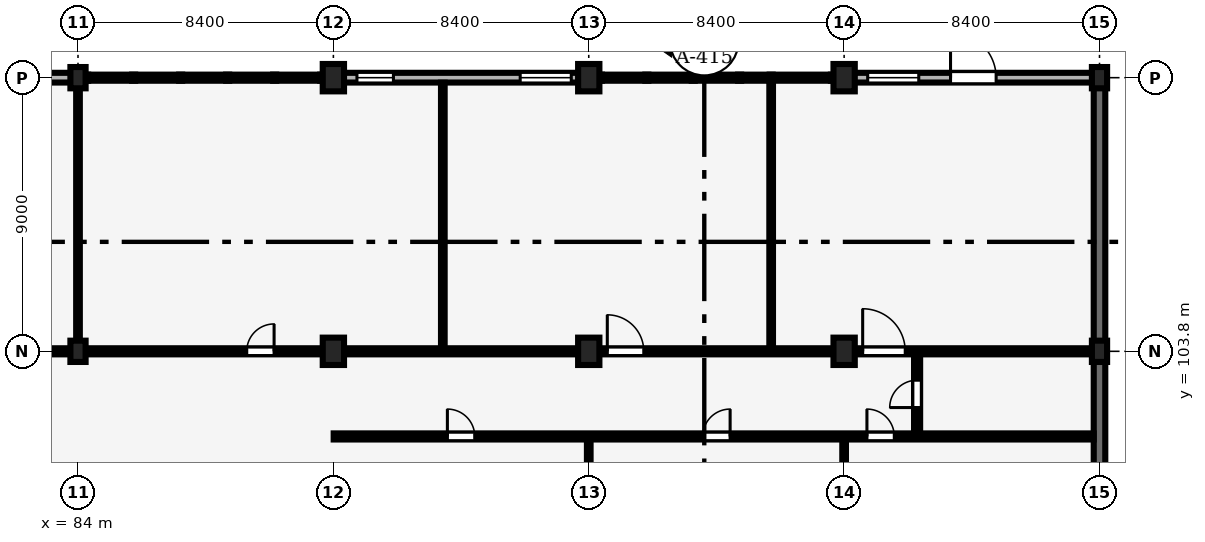
"""IFC4 building model, lengths in metres.
Left out: names, types, materials, properties, quantities, classifications, styles, units other than length and angle.
Written with IfcOpenShell. Run it as: python <this file> out.ifc"""

import sys

from ifc_helpers import new_model, si_unit, direction, frame, frame_2d, origin, origin_2d, place, context, subcontext, project, spatial, rectangle, extrude, element, fill, save


model = new_model("IFC4")
c1 = context("Model", 3, precision=1e-05, world=origin(), true_north=direction((0.0, 1.0)))
c2 = subcontext(c1, "Body", "Model", "MODEL_VIEW")
j1 = project(units=[si_unit("LENGTHUNIT", "METRE"), si_unit("PLANEANGLEUNIT", "RADIAN")], contexts=[c1])
p1 = place(None, origin())
s1 = spatial("IfcSite", under=j1, at=p1, CompositionType="ELEMENT")
p2 = place(p1, origin())
s2 = spatial("IfcBuilding", under=s1, at=p2, CompositionType="ELEMENT")
p3 = place(p2, origin())
s3 = spatial("IfcBuildingStorey", under=s2, at=p3, CompositionType="ELEMENT", Elevation=0.0)
for number, where, z_axis, x_axis in (
    (1, (84.0, 103.8, 0.0), (0.0, 0.0, 1.0), (1.0, 0.0, 0.0)),
    (2, (84.0, 112.8, 0.0), (0.0, 0.0, 1.0), (1.0, 0.0, 0.0)),
):
    element("IfcColumn", number, at=place(p3, frame(where, z_axis=z_axis, x_axis=x_axis)), inside=s3, PredefinedType="COLUMN", context=c2, shape_type="SweptSolid", body=[
        extrude(rectangle(XDim=0.5, YDim=0.7, at=origin_2d()), origin(), (0.0, 0.0, 1.0), 4.8),
    ])
for number, where, z_axis, x_axis in (
    (3, (92.4, 103.8, 0.0), (0.0, 0.0, 1.0), (1.0, 0.0, 0.0)),
    (4, (92.4, 112.8, 0.0), (0.0, 0.0, 1.0), (1.0, 0.0, 0.0)),
    (5, (100.8, 103.8, 0.0), (0.0, 0.0, 1.0), (1.0, 0.0, 0.0)),
    (6, (100.8, 112.8, 0.0), (0.0, 0.0, 1.0), (1.0, 0.0, 0.0)),
    (7, (109.2, 103.8, 0.0), (0.0, 0.0, 1.0), (1.0, 0.0, 0.0)),
    (8, (109.2, 112.8, 0.0), (0.0, 0.0, 1.0), (1.0, 0.0, 0.0)),
):
    element("IfcColumn", number, at=place(p3, frame(where, z_axis=z_axis, x_axis=x_axis)), inside=s3, PredefinedType="COLUMN", context=c2, shape_type="SweptSolid", body=[
        extrude(rectangle(XDim=0.7, YDim=0.9, at=origin_2d()), origin(), (0.0, 0.0, 1.0), 4.8),
    ])
for number, where, z_axis, x_axis in (
    (9, (117.6, 103.8, 0.0), (0.0, 0.0, 1.0), (1.0, 0.0, 0.0)),
    (10, (117.6, 112.8, 0.0), (0.0, 0.0, 1.0), (1.0, 0.0, 0.0)),
):
    element("IfcColumn", number, at=place(p3, frame(where, z_axis=z_axis, x_axis=x_axis)), inside=s3, PredefinedType="COLUMN", context=c2, shape_type="SweptSolid", body=[
        extrude(rectangle(XDim=0.5, YDim=0.7, at=origin_2d()), origin(), (0.0, 0.0, 1.0), 4.8),
    ])
p4 = place(p3, frame((117.6, 95.125, 0.0), z_axis=(0.0, 0.0, 1.0), x_axis=(0.0, 1.0, 0.0)))
e11 = element("IfcWall", 11, at=p4, inside=s3, PredefinedType="SHEAR", context=c2, shape_type="SweptSolid", body=[
    extrude(rectangle(XDim=8.35, YDim=0.38, at=frame_2d((4.175, 0.0))), origin(), (0.0, 0.0, 1.0), 3.57),
])
p5 = place(p3, frame((117.6, 104.125, 0.0), z_axis=(0.0, 0.0, 1.0), x_axis=(0.0, 1.0, 0.0)))
e12 = element("IfcWall", 12, at=p5, inside=s3, PredefinedType="SHEAR", context=c2, shape_type="SweptSolid", body=[
    extrude(rectangle(XDim=8.35, YDim=0.38, at=frame_2d((4.175, 0.0))), origin(), (0.0, 0.0, 1.0), 3.52),
])
p6 = place(p3, frame((75.825, 112.8, 0.0), z_axis=(0.0, 0.0, 1.0), x_axis=(1.0, 0.0, 0.0)))
e13 = element("IfcWall", 13, at=p6, inside=s3, PredefinedType="SOLIDWALL", context=c2, shape_type="SweptSolid", body=[
    extrude(rectangle(XDim=7.95, YDim=0.32, at=frame_2d((3.975, 0.0))), origin(), (0.0, 0.0, 1.0), 3.82),
])
p7 = place(p6, frame((2.775, 0.0, 0.0)))
e14 = element("IfcOpeningElement", 14, at=p7, cuts=e13, PredefinedType="OPENING", context=c2, shape_type="SweptSolid", body=[
    extrude(rectangle(XDim=2.4, YDim=2.6, at=frame_2d((1.2, 1.3))), frame((0.0, 0.17, 0.0), z_axis=(0.0, -1.0, 0.0), x_axis=(1.0, 0.0, 0.0)), (0.0, 0.0, 1.0), 0.34),
])
p8 = place(p6, frame((0.45, 0.0, 0.95)))
e15 = element("IfcOpeningElement", 15, at=p8, cuts=e13, PredefinedType="OPENING", context=c2, shape_type="SweptSolid", body=[
    extrude(rectangle(XDim=1.68, YDim=1.8, at=frame_2d((0.84, 0.9))), frame((0.0, 0.17, 0.0), z_axis=(0.0, -1.0, 0.0), x_axis=(1.0, 0.0, 0.0)), (0.0, 0.0, 1.0), 0.34),
])
p9 = place(p3, frame((92.725, 112.8, 0.0), z_axis=(0.0, 0.0, 1.0), x_axis=(1.0, 0.0, 0.0)))
e16 = element("IfcWall", 16, at=p9, inside=s3, PredefinedType="SOLIDWALL", context=c2, shape_type="SweptSolid", body=[
    extrude(rectangle(XDim=7.75, YDim=0.32, at=frame_2d((3.875, 0.0))), origin(), (0.0, 0.0, 1.0), 3.72),
])
p10 = place(p9, frame((0.45, 0.0, 0.9)))
e17 = element("IfcOpeningElement", 17, at=p10, cuts=e16, PredefinedType="OPENING", context=c2, shape_type="SweptSolid", body=[
    extrude(rectangle(XDim=1.2, YDim=1.8, at=frame_2d((0.6, 0.9))), frame((0.0, 0.17, 0.0), z_axis=(0.0, -1.0, 0.0), x_axis=(1.0, 0.0, 0.0)), (0.0, 0.0, 1.0), 0.34),
])
p11 = place(p9, frame((5.82, 0.0, 0.9)))
e18 = element("IfcOpeningElement", 18, at=p11, cuts=e16, PredefinedType="OPENING", context=c2, shape_type="SweptSolid", body=[
    extrude(rectangle(XDim=1.68, YDim=2.4, at=frame_2d((0.84, 1.2))), frame((0.0, 0.17, 0.0), z_axis=(0.0, -1.0, 0.0), x_axis=(1.0, 0.0, 0.0)), (0.0, 0.0, 1.0), 0.34),
])
p12 = place(p3, frame((109.525, 112.8, 0.0), z_axis=(0.0, 0.0, 1.0), x_axis=(1.0, 0.0, 0.0)))
e19 = element("IfcWall", 19, at=p12, inside=s3, PredefinedType="SOLIDWALL", context=c2, shape_type="SweptSolid", body=[
    extrude(rectangle(XDim=7.85, YDim=0.32, at=frame_2d((3.925, 0.0))), origin(), (0.0, 0.0, 1.0), 3.72),
])
p13 = place(p12, frame((3.175, 0.0, 0.0)))
e20 = element("IfcOpeningElement", 20, at=p13, cuts=e19, PredefinedType="OPENING", context=c2, shape_type="SweptSolid", body=[
    extrude(rectangle(XDim=1.5, YDim=2.35, at=frame_2d((0.75, 1.175))), frame((0.0, 0.17, 0.0), z_axis=(0.0, -1.0, 0.0), x_axis=(1.0, 0.0, 0.0)), (0.0, 0.0, 1.0), 0.34),
])
p14 = place(p12, frame((0.45, 0.0, 0.95)))
e21 = element("IfcOpeningElement", 21, at=p14, cuts=e19, PredefinedType="OPENING", context=c2, shape_type="SweptSolid", body=[
    extrude(rectangle(XDim=1.68, YDim=1.8, at=frame_2d((0.84, 0.9))), frame((0.0, 0.17, 0.0), z_axis=(0.0, -1.0, 0.0), x_axis=(1.0, 0.0, 0.0)), (0.0, 0.0, 1.0), 0.34),
])
p15 = place(p3, frame((111.6, 101.01, 0.0), z_axis=(0.0, 0.0, 1.0), x_axis=(0.0, 1.0, 0.0)))
e22 = element("IfcWall", 22, at=p15, inside=s3, PredefinedType="PARTITIONING", context=c2, shape_type="SweptSolid", body=[
    extrude(rectangle(XDim=2.78, YDim=0.2, at=frame_2d((1.39, 0.0))), origin(), (0.0, 0.0, 1.0), 4.5),
])
p16 = place(p15, frame((0.94, 0.0, 0.0)))
e23 = element("IfcOpeningElement", 23, at=p16, cuts=e22, PredefinedType="OPENING", context=c2, shape_type="SweptSolid", body=[
    extrude(rectangle(XDim=0.9, YDim=2.1, at=frame_2d((0.45, 1.05))), frame((0.0, 0.11, 0.0), z_axis=(0.0, -1.0, 0.0), x_axis=(1.0, 0.0, 0.0)), (0.0, 0.0, 1.0), 0.22),
])
p17 = place(p3, frame((84.0, 103.905, 0.0), z_axis=(0.0, 0.0, 1.0), x_axis=(0.0, 1.0, 0.0)))
e24 = element("IfcWall", 24, at=p17, inside=s3, PredefinedType="PARTITIONING", context=c2, shape_type="SweptSolid", body=[
    extrude(rectangle(XDim=8.73, YDim=0.12, at=frame_2d((4.365, 0.0))), origin(), (0.0, 0.0, 1.0), 3.72),
])
p18 = place(p3, frame((96.0, 103.905, 0.0), z_axis=(0.0, 0.0, 1.0), x_axis=(0.0, 1.0, 0.0)))
e25 = element("IfcWall", 25, at=p18, inside=s3, PredefinedType="PARTITIONING", context=c2, shape_type="SweptSolid", body=[
    extrude(rectangle(XDim=8.73, YDim=0.12, at=frame_2d((4.365, 0.0))), origin(), (0.0, 0.0, 1.0), 4.5),
])
p19 = place(p3, frame((106.8, 103.905, 0.0), z_axis=(0.0, 0.0, 1.0), x_axis=(0.0, 1.0, 0.0)))
e26 = element("IfcWall", 26, at=p19, inside=s3, PredefinedType="PARTITIONING", context=c2, shape_type="SweptSolid", body=[
    extrude(rectangle(XDim=8.79, YDim=0.12, at=frame_2d((4.395, 0.0))), origin(), (0.0, 0.0, 1.0), 4.5),
])
p20 = place(p3, frame((75.86, 103.8, 0.0), z_axis=(0.0, 0.0, 1.0), x_axis=(1.0, 0.0, 0.0)))
e27 = element("IfcWall", 27, at=p20, inside=s3, PredefinedType="PARTITIONING", context=c2, shape_type="SweptSolid", body=[
    extrude(rectangle(XDim=7.88, YDim=0.2, at=frame_2d((3.94, 0.0))), origin(), (0.0, 0.0, 1.0), 3.57),
])
p21 = place(p20, frame((3.09, 0.0, 0.0)))
e28 = element("IfcOpeningElement", 28, at=p21, cuts=e27, PredefinedType="OPENING", context=c2, shape_type="SweptSolid", body=[
    extrude(rectangle(XDim=1.7, YDim=2.25, at=frame_2d((0.85, 1.125))), frame((0.0, 0.11, 0.0), z_axis=(0.0, -1.0, 0.0), x_axis=(1.0, 0.0, 0.0)), (0.0, 0.0, 1.0), 0.22),
])
p22 = place(p3, frame((84.26, 103.8, 0.0), z_axis=(0.0, 0.0, 1.0), x_axis=(1.0, 0.0, 0.0)))
e29 = element("IfcWall", 29, at=p22, inside=s3, PredefinedType="PARTITIONING", context=c2, shape_type="SweptSolid", body=[
    extrude(rectangle(XDim=7.78, YDim=0.2, at=frame_2d((3.89, 0.0))), origin(), (0.0, 0.0, 1.0), 3.52),
])
p23 = place(p22, frame((5.29, 0.0, 0.0)))
e30 = element("IfcOpeningElement", 30, at=p23, cuts=e29, PredefinedType="OPENING", context=c2, shape_type="SweptSolid", body=[
    extrude(rectangle(XDim=0.9, YDim=2.1, at=frame_2d((0.45, 1.05))), frame((0.0, 0.11, 0.0), z_axis=(0.0, -1.0, 0.0), x_axis=(1.0, 0.0, 0.0)), (0.0, 0.0, 1.0), 0.22),
])
p24 = place(p3, frame((92.76, 103.8, 0.0), z_axis=(0.0, 0.0, 1.0), x_axis=(1.0, 0.0, 0.0)))
e31 = element("IfcWall", 31, at=p24, inside=s3, PredefinedType="PARTITIONING", context=c2, shape_type="SweptSolid", body=[
    extrude(rectangle(XDim=7.68, YDim=0.2, at=frame_2d((3.84, 0.0))), origin(), (0.0, 0.0, 1.0), 3.47),
])
p25 = place(p3, frame((101.16, 103.8, 0.0), z_axis=(0.0, 0.0, 1.0), x_axis=(1.0, 0.0, 0.0)))
e32 = element("IfcWall", 32, at=p25, inside=s3, PredefinedType="PARTITIONING", context=c2, shape_type="SweptSolid", body=[
    extrude(rectangle(XDim=7.68, YDim=0.2, at=frame_2d((3.84, 0.0))), origin(), (0.0, 0.0, 1.0), 3.37),
])
p26 = place(p25, frame((0.25, 0.0, 0.0)))
e33 = element("IfcOpeningElement", 33, at=p26, cuts=e32, PredefinedType="OPENING", context=c2, shape_type="SweptSolid", body=[
    extrude(rectangle(XDim=1.2, YDim=2.2, at=frame_2d((0.6, 1.1))), frame((0.0, 0.11, 0.0), z_axis=(0.0, -1.0, 0.0), x_axis=(1.0, 0.0, 0.0)), (0.0, 0.0, 1.0), 0.22),
])
p27 = place(p3, frame((109.56, 103.8, 0.0), z_axis=(0.0, 0.0, 1.0), x_axis=(1.0, 0.0, 0.0)))
e34 = element("IfcWall", 34, at=p27, inside=s3, PredefinedType="PARTITIONING", context=c2, shape_type="SweptSolid", body=[
    extrude(rectangle(XDim=7.845, YDim=0.2, at=frame_2d((3.922, 0.0))), origin(), (0.0, 0.0, 1.0), 3.92),
])
p28 = place(p27, frame((0.25, 0.0, 0.0)))
e35 = element("IfcOpeningElement", 35, at=p28, cuts=e34, PredefinedType="OPENING", context=c2, shape_type="SweptSolid", body=[
    extrude(rectangle(XDim=1.4, YDim=2.2, at=frame_2d((0.7, 1.1))), frame((0.0, 0.11, 0.0), z_axis=(0.0, -1.0, 0.0), x_axis=(1.0, 0.0, 0.0)), (0.0, 0.0, 1.0), 0.22),
])
p29 = place(p3, frame((100.8, 95.26, 0.0), z_axis=(0.0, 0.0, 1.0), x_axis=(0.0, 1.0, 0.0)))
e36 = element("IfcWall", 36, at=p29, inside=s3, PredefinedType="PARTITIONING", context=c2, shape_type="SweptSolid", body=[
    extrude(rectangle(XDim=5.635, YDim=0.12, at=frame_2d((2.817, 0.0))), origin(), (0.0, 0.0, 1.0), 3.62),
])
p30 = place(p3, frame((109.2, 95.26, 0.0), z_axis=(0.0, 0.0, 1.0), x_axis=(0.0, 1.0, 0.0)))
e37 = element("IfcWall", 37, at=p30, inside=s3, PredefinedType="PARTITIONING", context=c2, shape_type="SweptSolid", body=[
    extrude(rectangle(XDim=5.635, YDim=0.12, at=frame_2d((2.817, 0.0))), origin(), (0.0, 0.0, 1.0), 3.72),
])
p31 = place(p3, frame((92.41, 101.0, 0.0), z_axis=(0.0, 0.0, 1.0), x_axis=(1.0, 0.0, 0.0)))
e38 = element("IfcWall", 38, at=p31, inside=s3, PredefinedType="PARTITIONING", context=c2, shape_type="SweptSolid", body=[
    extrude(rectangle(XDim=24.995, YDim=0.2, at=frame_2d((12.498, 0.0))), origin(), (0.0, 0.0, 1.0), 4.04),
])
p32 = place(p31, frame((3.74, 0.0, 0.0)))
e39 = element("IfcOpeningElement", 39, at=p32, cuts=e38, PredefinedType="OPENING", context=c2, shape_type="SweptSolid", body=[
    extrude(rectangle(XDim=0.9, YDim=2.1, at=frame_2d((0.45, 1.05))), frame((0.0, 0.11, 0.0), z_axis=(0.0, -1.0, 0.0), x_axis=(1.0, 0.0, 0.0)), (0.0, 0.0, 1.0), 0.22),
])
p33 = place(p31, frame((12.14, 0.0, 0.0)))
e40 = element("IfcOpeningElement", 40, at=p33, cuts=e38, PredefinedType="OPENING", context=c2, shape_type="SweptSolid", body=[
    extrude(rectangle(XDim=0.9, YDim=2.1, at=frame_2d((0.45, 1.05))), frame((0.0, 0.11, 0.0), z_axis=(0.0, -1.0, 0.0), x_axis=(1.0, 0.0, 0.0)), (0.0, 0.0, 1.0), 0.22),
])
p34 = place(p31, frame((17.54, 0.0, 0.0)))
e41 = element("IfcOpeningElement", 41, at=p34, cuts=e38, PredefinedType="OPENING", context=c2, shape_type="SweptSolid", body=[
    extrude(rectangle(XDim=0.9, YDim=2.1, at=frame_2d((0.45, 1.05))), frame((0.0, 0.11, 0.0), z_axis=(0.0, -1.0, 0.0), x_axis=(1.0, 0.0, 0.0)), (0.0, 0.0, 1.0), 0.22),
])
p35 = place(p10, origin())
e42 = element("IfcWindow", 42, at=p35, inside=s3, PartitioningType="SINGLE_PANEL", PredefinedType="WINDOW", context=c2, shape_type="SweptSolid", body=[
    extrude(rectangle(XDim=1.2, YDim=1.8, at=frame_2d((0.6, 0.9))), frame((0.0, 0.03, 0.0), z_axis=(0.0, -1.0, 0.0), x_axis=(1.0, 0.0, 0.0)), (0.0, 0.0, 1.0), 0.06),
])
fill(e17, e42)
p36 = place(p11, origin())
e43 = element("IfcWindow", 43, at=p36, inside=s3, PartitioningType="SINGLE_PANEL", PredefinedType="WINDOW", context=c2, shape_type="SweptSolid", body=[
    extrude(rectangle(XDim=1.68, YDim=2.4, at=frame_2d((0.84, 1.2))), frame((0.0, 0.03, 0.0), z_axis=(0.0, -1.0, 0.0), x_axis=(1.0, 0.0, 0.0)), (0.0, 0.0, 1.0), 0.06),
])
fill(e18, e43)
p37 = place(p13, origin())
e44 = element("IfcDoor", 44, at=p37, inside=s3, OperationType="DOUBLE_DOOR_SINGLE_SWING", PredefinedType="DOOR", context=c2, shape_type="SweptSolid", body=[
    extrude(rectangle(XDim=1.5, YDim=2.35, at=frame_2d((0.75, 1.175))), frame((0.0, 0.025, 0.0), z_axis=(0.0, -1.0, 0.0), x_axis=(1.0, 0.0, 0.0)), (0.0, 0.0, 1.0), 0.05),
])
fill(e20, e44)
p38 = place(p14, origin())
e45 = element("IfcWindow", 45, at=p38, inside=s3, PartitioningType="SINGLE_PANEL", PredefinedType="WINDOW", context=c2, shape_type="SweptSolid", body=[
    extrude(rectangle(XDim=1.68, YDim=1.8, at=frame_2d((0.84, 0.9))), frame((0.0, 0.03, 0.0), z_axis=(0.0, -1.0, 0.0), x_axis=(1.0, 0.0, 0.0)), (0.0, 0.0, 1.0), 0.06),
])
fill(e21, e45)
p39 = place(p16, origin())
e46 = element("IfcDoor", 46, at=p39, inside=s3, OperationType="SINGLE_SWING_LEFT", PredefinedType="DOOR", context=c2, shape_type="SweptSolid", body=[
    extrude(rectangle(XDim=0.9, YDim=2.1, at=frame_2d((0.45, 1.05))), frame((0.0, 0.025, 0.0), z_axis=(0.0, -1.0, 0.0), x_axis=(1.0, 0.0, 0.0)), (0.0, 0.0, 1.0), 0.05),
])
fill(e23, e46)
p40 = place(p23, origin())
e47 = element("IfcDoor", 47, at=p40, inside=s3, OperationType="SINGLE_SWING_RIGHT", PredefinedType="DOOR", context=c2, shape_type="SweptSolid", body=[
    extrude(rectangle(XDim=0.9, YDim=2.1, at=frame_2d((0.45, 1.05))), frame((0.0, 0.025, 0.0), z_axis=(0.0, -1.0, 0.0), x_axis=(1.0, 0.0, 0.0)), (0.0, 0.0, 1.0), 0.05),
])
fill(e30, e47)
p41 = place(p26, origin())
e48 = element("IfcDoor", 48, at=p41, inside=s3, OperationType="SINGLE_SWING_LEFT", PredefinedType="DOOR", context=c2, shape_type="SweptSolid", body=[
    extrude(rectangle(XDim=1.2, YDim=2.2, at=frame_2d((0.6, 1.1))), frame((0.0, 0.025, 0.0), z_axis=(0.0, -1.0, 0.0), x_axis=(1.0, 0.0, 0.0)), (0.0, 0.0, 1.0), 0.05),
])
fill(e33, e48)
p42 = place(p28, origin())
e49 = element("IfcDoor", 49, at=p42, inside=s3, OperationType="DOUBLE_DOOR_SINGLE_SWING", PredefinedType="DOOR", context=c2, shape_type="SweptSolid", body=[
    extrude(rectangle(XDim=1.4, YDim=2.2, at=frame_2d((0.7, 1.1))), frame((0.0, 0.025, 0.0), z_axis=(0.0, -1.0, 0.0), x_axis=(1.0, 0.0, 0.0)), (0.0, 0.0, 1.0), 0.05),
])
fill(e35, e49)
p43 = place(p32, origin())
e50 = element("IfcDoor", 50, at=p43, inside=s3, OperationType="SINGLE_SWING_LEFT", PredefinedType="DOOR", context=c2, shape_type="SweptSolid", body=[
    extrude(rectangle(XDim=0.9, YDim=2.1, at=frame_2d((0.45, 1.05))), frame((0.0, 0.025, 0.0), z_axis=(0.0, -1.0, 0.0), x_axis=(1.0, 0.0, 0.0)), (0.0, 0.0, 1.0), 0.05),
])
fill(e39, e50)
p44 = place(p33, origin())
e51 = element("IfcDoor", 51, at=p44, inside=s3, OperationType="SINGLE_SWING_RIGHT", PredefinedType="DOOR", context=c2, shape_type="SweptSolid", body=[
    extrude(rectangle(XDim=0.9, YDim=2.1, at=frame_2d((0.45, 1.05))), frame((0.0, 0.025, 0.0), z_axis=(0.0, -1.0, 0.0), x_axis=(1.0, 0.0, 0.0)), (0.0, 0.0, 1.0), 0.05),
])
fill(e40, e51)
p45 = place(p34, origin())
e52 = element("IfcDoor", 52, at=p45, inside=s3, OperationType="SINGLE_SWING_LEFT", PredefinedType="DOOR", context=c2, shape_type="SweptSolid", body=[
    extrude(rectangle(XDim=0.9, YDim=2.1, at=frame_2d((0.45, 1.05))), frame((0.0, 0.025, 0.0), z_axis=(0.0, -1.0, 0.0), x_axis=(1.0, 0.0, 0.0)), (0.0, 0.0, 1.0), 0.05),
])
fill(e41, e52)
save(model, sys.argv[1])
